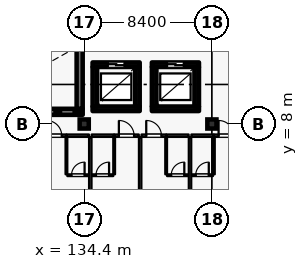
"""IFC4 building model, lengths in metres.
Left out: names, types, materials, properties, quantities, classifications, styles, units other than length and angle.
Written with IfcOpenShell. Run it as: python <this file> out.ifc"""

import sys

from ifc_helpers import new_model, si_unit, direction, frame, frame_2d, origin, origin_2d, place, context, subcontext, project, spatial, rectangle, hollow_rectangle, extrude, element, fill, save


model = new_model("IFC4")
c1 = context("Model", 3, precision=1e-05, world=origin(), true_north=direction((0.0, 1.0)))
c2 = subcontext(c1, "Body", "Model", "MODEL_VIEW")
j1 = project(units=[si_unit("LENGTHUNIT", "METRE"), si_unit("PLANEANGLEUNIT", "RADIAN")], contexts=[c1])
p1 = place(None, origin())
s1 = spatial("IfcSite", under=j1, at=p1, CompositionType="ELEMENT")
p2 = place(p1, origin())
s2 = spatial("IfcBuilding", under=s1, at=p2, CompositionType="ELEMENT")
p3 = place(p2, frame((0.0, 0.0, 36.0)))
s3 = spatial("IfcBuildingStorey", under=s2, at=p3, CompositionType="ELEMENT", Elevation=36.0)
for number, where, z_axis, x_axis in (
    (1, (134.4, 8.0, 0.0), (0.0, 0.0, 1.0), (1.0, 0.0, 0.0)),
    (2, (142.8, 8.0, 0.0), (0.0, 0.0, 1.0), (1.0, 0.0, 0.0)),
):
    element("IfcColumn", number, at=place(p3, frame(where, z_axis=z_axis, x_axis=x_axis)), inside=s3, PredefinedType="COLUMN", context=c2, shape_type="SweptSolid", body=[
        extrude(rectangle(XDim=0.6, YDim=0.6, at=origin_2d()), origin(), (0.0, 0.0, 1.0), 3.6),
    ])
p4 = place(p3, frame((150.85, 7.667, 0.0), z_axis=(0.0, 0.0, 1.0), x_axis=(-0.724116091282, -0.689678103427, 0.0)))
e3 = element("IfcWall", 3, at=p4, inside=s3, PredefinedType="SOLIDWALL", context=c2, shape_type="SweptSolid", body=[
    extrude(rectangle(XDim=10.634, YDim=0.24, at=frame_2d((5.317, 0.0))), origin(), (0.0, 0.0, 1.0), 2.94),
])
p5 = place(p4, frame((1.204, 0.0, 0.0)))
e4 = element("IfcOpeningElement", 4, at=p5, cuts=e3, PredefinedType="OPENING", context=c2, shape_type="SweptSolid", body=[
    extrude(rectangle(XDim=1.5, YDim=2.25, at=frame_2d((0.75, 1.125))), frame((0.0, 0.13, 0.0), z_axis=(0.0, -1.0, 0.0), x_axis=(1.0, 0.0, 0.0)), (0.0, 0.0, 1.0), 0.26),
])
p6 = place(p4, frame((5.511, 0.0, 0.8)))
e5 = element("IfcOpeningElement", 5, at=p6, cuts=e3, PredefinedType="OPENING", context=c2, shape_type="SweptSolid", body=[
    extrude(rectangle(XDim=1.6, YDim=1.6, at=frame_2d((0.8, 0.8))), frame((0.0, 0.13, 0.0), z_axis=(0.0, -1.0, 0.0), x_axis=(1.0, 0.0, 0.0)), (0.0, 0.0, 1.0), 0.26),
])
p7 = place(p4, frame((8.874, 0.0, 0.8)))
e6 = element("IfcOpeningElement", 6, at=p7, cuts=e3, PredefinedType="OPENING", context=c2, shape_type="SweptSolid", body=[
    extrude(rectangle(XDim=1.6, YDim=1.6, at=frame_2d((0.8, 0.8))), frame((0.0, 0.13, 0.0), z_axis=(0.0, -1.0, 0.0), x_axis=(1.0, 0.0, 0.0)), (0.0, 0.0, 1.0), 0.26),
])
p8 = place(p3, frame((134.95, 9.0, 0.0), z_axis=(0.0, 0.0, 1.0), x_axis=(1.0, 0.0, 0.0)))
e7 = element("IfcWall", 7, at=p8, inside=s3, PredefinedType="SHEAR", context=c2, shape_type="SweptSolid", body=[
    extrude(rectangle(XDim=3.1, YDim=0.3, at=frame_2d((1.55, 0.0))), origin(), (0.0, 0.0, 1.0), 3.365),
])
p9 = place(p3, frame((137.9, 9.155, 0.0), z_axis=(0.0, 0.0, 1.0), x_axis=(0.0, 1.0, 0.0)))
e8 = element("IfcWall", 8, at=p9, inside=s3, PredefinedType="SHEAR", context=c2, shape_type="SweptSolid", body=[
    extrude(rectangle(XDim=2.59, YDim=0.3, at=frame_2d((1.295, 0.0))), origin(), (0.0, 0.0, 1.0), 3.365),
])
p10 = place(p3, frame((138.05, 11.9, 0.0), z_axis=(0.0, 0.0, 1.0), x_axis=(-1.0, 0.0, 0.0)))
e9 = element("IfcWall", 9, at=p10, inside=s3, PredefinedType="SHEAR", context=c2, shape_type="SweptSolid", body=[
    extrude(rectangle(XDim=3.1, YDim=0.3, at=frame_2d((1.55, 0.0))), origin(), (0.0, 0.0, 1.0), 3.365),
])
p11 = place(p10, frame((1.0, 0.0, 0.0)))
e10 = element("IfcOpeningElement", 10, at=p11, cuts=e9, PredefinedType="OPENING", context=c2, shape_type="SweptSolid", body=[
    extrude(rectangle(XDim=1.1, YDim=2.2, at=frame_2d((0.55, 1.1))), frame((0.0, 0.16, 0.0), z_axis=(0.0, -1.0, 0.0), x_axis=(1.0, 0.0, 0.0)), (0.0, 0.0, 1.0), 0.32),
])
p12 = place(p3, frame((135.1, 11.745, 0.0), z_axis=(0.0, 0.0, 1.0), x_axis=(0.0, -1.0, 0.0)))
e11 = element("IfcWall", 11, at=p12, inside=s3, PredefinedType="SHEAR", context=c2, shape_type="SweptSolid", body=[
    extrude(rectangle(XDim=2.59, YDim=0.3, at=frame_2d((1.295, 0.0))), origin(), (0.0, 0.0, 1.0), 3.365),
])
p13 = place(p3, frame((138.85, 9.0, 0.0), z_axis=(0.0, 0.0, 1.0), x_axis=(1.0, 0.0, 0.0)))
e12 = element("IfcWall", 12, at=p13, inside=s3, PredefinedType="SHEAR", context=c2, shape_type="SweptSolid", body=[
    extrude(rectangle(XDim=3.1, YDim=0.3, at=frame_2d((1.55, 0.0))), origin(), (0.0, 0.0, 1.0), 3.365),
])
p14 = place(p3, frame((141.8, 9.155, 0.0), z_axis=(0.0, 0.0, 1.0), x_axis=(0.0, 1.0, 0.0)))
e13 = element("IfcWall", 13, at=p14, inside=s3, PredefinedType="SHEAR", context=c2, shape_type="SweptSolid", body=[
    extrude(rectangle(XDim=2.59, YDim=0.3, at=frame_2d((1.295, 0.0))), origin(), (0.0, 0.0, 1.0), 3.365),
])
p15 = place(p3, frame((141.95, 11.9, 0.0), z_axis=(0.0, 0.0, 1.0), x_axis=(-1.0, 0.0, 0.0)))
e14 = element("IfcWall", 14, at=p15, inside=s3, PredefinedType="SHEAR", context=c2, shape_type="SweptSolid", body=[
    extrude(rectangle(XDim=3.1, YDim=0.3, at=frame_2d((1.55, 0.0))), origin(), (0.0, 0.0, 1.0), 3.365),
])
p16 = place(p15, frame((1.0, 0.0, 0.0)))
e15 = element("IfcOpeningElement", 15, at=p16, cuts=e14, PredefinedType="OPENING", context=c2, shape_type="SweptSolid", body=[
    extrude(rectangle(XDim=1.1, YDim=2.2, at=frame_2d((0.55, 1.1))), frame((0.0, 0.16, 0.0), z_axis=(0.0, -1.0, 0.0), x_axis=(1.0, 0.0, 0.0)), (0.0, 0.0, 1.0), 0.32),
])
p17 = place(p3, frame((139.0, 11.745, 0.0), z_axis=(0.0, 0.0, 1.0), x_axis=(0.0, -1.0, 0.0)))
e16 = element("IfcWall", 16, at=p17, inside=s3, PredefinedType="SHEAR", context=c2, shape_type="SweptSolid", body=[
    extrude(rectangle(XDim=2.59, YDim=0.3, at=frame_2d((1.295, 0.0))), origin(), (0.0, 0.0, 1.0), 3.365),
])
p18 = place(p3, frame((126.1, 8.8, 0.0), z_axis=(0.0, 0.0, 1.0), x_axis=(1.0, 0.0, 0.0)))
e17 = element("IfcWall", 17, at=p18, inside=s3, PredefinedType="SHEAR", context=c2, shape_type="SweptSolid", body=[
    extrude(rectangle(XDim=8.2, YDim=0.4, at=frame_2d((4.1, 0.0))), origin(), (0.0, 0.0, 1.0), 3.365),
])
p19 = place(p3, frame((134.1, 9.005, 0.0), z_axis=(0.0, 0.0, 1.0), x_axis=(0.0, 1.0, 0.0)))
e18 = element("IfcWall", 18, at=p19, inside=s3, PredefinedType="SHEAR", context=c2, shape_type="SweptSolid", body=[
    extrude(rectangle(XDim=3.95, YDim=0.4, at=frame_2d((1.975, 0.0))), origin(), (0.0, 0.0, 1.0), 3.365),
])
for number, where, z_axis, x_axis in (
    (19, (132.66, 8.8, -1.8), (0.0, 0.0, 1.0), (1.0, 0.0, 0.0)),
    (20, (133.92, 8.8, -1.8), (0.0, 0.0, 1.0), (1.0, 0.0, 0.0)),
):
    element("IfcColumn", number, at=place(p3, frame(where, z_axis=z_axis, x_axis=x_axis)), inside=s3, PredefinedType="COLUMN", context=c2, shape_type="SweptSolid", body=[
        extrude(hollow_rectangle(XDim=0.3, YDim=0.3, WallThickness=0.012, at=origin_2d()), origin(), (0.0, 0.0, 1.0), 3.42),
    ])
p20 = place(p3, frame((131.61, 7.23, 0.0), z_axis=(0.0, 0.0, 1.0), x_axis=(1.0, 0.0, 0.0)))
e21 = element("IfcWall", 21, at=p20, inside=s3, PredefinedType="PARTITIONING", context=c2, shape_type="SweptSolid", body=[
    extrude(rectangle(XDim=1.62, YDim=0.16, at=frame_2d((0.81, 0.0))), origin(), (0.0, 0.0, 1.0), 3.365),
])
p21 = place(p20, frame((0.31, 0.0, 0.0)))
e22 = element("IfcOpeningElement", 22, at=p21, cuts=e21, PredefinedType="OPENING", context=c2, shape_type="SweptSolid", body=[
    extrude(rectangle(XDim=1.0, YDim=2.25, at=frame_2d((0.5, 1.125))), frame((0.0, 0.09, 0.0), z_axis=(0.0, -1.0, 0.0), x_axis=(1.0, 0.0, 0.0)), (0.0, 0.0, 1.0), 0.18),
])
p22 = place(p3, frame((133.24, 7.23, 0.0), z_axis=(0.0, 0.0, 1.0), x_axis=(1.0, 0.0, 0.0)))
e23 = element("IfcWall", 23, at=p22, inside=s3, PredefinedType="PARTITIONING", context=c2, shape_type="SweptSolid", body=[
    extrude(rectangle(XDim=1.47, YDim=0.16, at=frame_2d((0.735, 0.0))), origin(), (0.0, 0.0, 1.0), 3.365),
])
p23 = place(p3, frame((133.23, 4.69, 0.0), z_axis=(0.0, 0.0, 1.0), x_axis=(0.0, 1.0, 0.0)))
e24 = element("IfcWall", 24, at=p23, inside=s3, PredefinedType="PARTITIONING", context=c2, shape_type="SweptSolid", body=[
    extrude(rectangle(XDim=2.45, YDim=0.115, at=frame_2d((1.225, 0.0))), origin(), (0.0, 0.0, 1.0), 3.365),
])
p24 = place(p3, frame((133.29, 4.63, 0.0), z_axis=(0.0, 0.0, 1.0), x_axis=(1.0, 0.0, 0.0)))
e25 = element("IfcWall", 25, at=p24, inside=s3, PredefinedType="PARTITIONING", context=c2, shape_type="SweptSolid", body=[
    extrude(rectangle(XDim=1.41, YDim=0.115, at=frame_2d((0.705, 0.0))), origin(), (0.0, 0.0, 1.0), 3.365),
])
p25 = place(p24, frame((0.275, 0.0, 0.0)))
e26 = element("IfcOpeningElement", 26, at=p25, cuts=e25, PredefinedType="OPENING", context=c2, shape_type="SweptSolid", body=[
    extrude(rectangle(XDim=0.86, YDim=2.12, at=frame_2d((0.43, 1.06))), frame((0.0, 0.067, 0.0), z_axis=(0.0, -1.0, 0.0), x_axis=(1.0, 0.0, 0.0)), (0.0, 0.0, 1.0), 0.135),
])
p26 = place(p3, frame((134.89, 7.23, 0.0), z_axis=(0.0, 0.0, 1.0), x_axis=(1.0, 0.0, 0.0)))
e27 = element("IfcWall", 27, at=p26, inside=s3, PredefinedType="PARTITIONING", context=c2, shape_type="SweptSolid", body=[
    extrude(rectangle(XDim=1.47, YDim=0.16, at=frame_2d((0.735, 0.0))), origin(), (0.0, 0.0, 1.0), 3.365),
])
p27 = place(p3, frame((136.37, 7.23, 0.0), z_axis=(0.0, 0.0, 1.0), x_axis=(1.0, 0.0, 0.0)))
e28 = element("IfcWall", 28, at=p27, inside=s3, PredefinedType="PARTITIONING", context=c2, shape_type="SweptSolid", body=[
    extrude(rectangle(XDim=1.62, YDim=0.16, at=frame_2d((0.81, 0.0))), origin(), (0.0, 0.0, 1.0), 3.365),
])
p28 = place(p27, frame((0.31, 0.0, 0.0)))
e29 = element("IfcOpeningElement", 29, at=p28, cuts=e28, PredefinedType="OPENING", context=c2, shape_type="SweptSolid", body=[
    extrude(rectangle(XDim=1.0, YDim=2.25, at=frame_2d((0.5, 1.125))), frame((0.0, 0.09, 0.0), z_axis=(0.0, -1.0, 0.0), x_axis=(1.0, 0.0, 0.0)), (0.0, 0.0, 1.0), 0.18),
])
p29 = place(p3, frame((136.37, 4.69, 0.0), z_axis=(0.0, 0.0, 1.0), x_axis=(0.0, 1.0, 0.0)))
e30 = element("IfcWall", 30, at=p29, inside=s3, PredefinedType="PARTITIONING", context=c2, shape_type="SweptSolid", body=[
    extrude(rectangle(XDim=2.45, YDim=0.115, at=frame_2d((1.225, 0.0))), origin(), (0.0, 0.0, 1.0), 3.365),
])
p30 = place(p3, frame((134.9, 4.63, 0.0), z_axis=(0.0, 0.0, 1.0), x_axis=(1.0, 0.0, 0.0)))
e31 = element("IfcWall", 31, at=p30, inside=s3, PredefinedType="PARTITIONING", context=c2, shape_type="SweptSolid", body=[
    extrude(rectangle(XDim=1.41, YDim=0.115, at=frame_2d((0.705, 0.0))), origin(), (0.0, 0.0, 1.0), 3.365),
])
p31 = place(p30, frame((0.275, 0.0, 0.0)))
e32 = element("IfcOpeningElement", 32, at=p31, cuts=e31, PredefinedType="OPENING", context=c2, shape_type="SweptSolid", body=[
    extrude(rectangle(XDim=0.86, YDim=2.12, at=frame_2d((0.43, 1.06))), frame((0.0, 0.067, 0.0), z_axis=(0.0, -1.0, 0.0), x_axis=(1.0, 0.0, 0.0)), (0.0, 0.0, 1.0), 0.135),
])
p32 = place(p3, frame((134.8, 0.34, 0.0), z_axis=(0.0, 0.0, 1.0), x_axis=(0.0, 1.0, 0.0)))
e33 = element("IfcWall", 33, at=p32, inside=s3, PredefinedType="PARTITIONING", context=c2, shape_type="SweptSolid", body=[
    extrude(rectangle(XDim=6.8, YDim=0.16, at=frame_2d((3.4, 0.0))), origin(), (0.0, 0.0, 1.0), 3.365),
])
p33 = place(p3, frame((138.17, 7.23, 0.0), z_axis=(0.0, 0.0, 1.0), x_axis=(1.0, 0.0, 0.0)))
e34 = element("IfcWall", 34, at=p33, inside=s3, PredefinedType="PARTITIONING", context=c2, shape_type="SweptSolid", body=[
    extrude(rectangle(XDim=1.62, YDim=0.16, at=frame_2d((0.81, 0.0))), origin(), (0.0, 0.0, 1.0), 3.365),
])
p34 = place(p33, frame((0.31, 0.0, 0.0)))
e35 = element("IfcOpeningElement", 35, at=p34, cuts=e34, PredefinedType="OPENING", context=c2, shape_type="SweptSolid", body=[
    extrude(rectangle(XDim=1.0, YDim=2.25, at=frame_2d((0.5, 1.125))), frame((0.0, 0.09, 0.0), z_axis=(0.0, -1.0, 0.0), x_axis=(1.0, 0.0, 0.0)), (0.0, 0.0, 1.0), 0.18),
])
p35 = place(p3, frame((139.8, 7.23, 0.0), z_axis=(0.0, 0.0, 1.0), x_axis=(1.0, 0.0, 0.0)))
e36 = element("IfcWall", 36, at=p35, inside=s3, PredefinedType="PARTITIONING", context=c2, shape_type="SweptSolid", body=[
    extrude(rectangle(XDim=1.47, YDim=0.16, at=frame_2d((0.735, 0.0))), origin(), (0.0, 0.0, 1.0), 3.365),
])
p36 = place(p3, frame((139.79, 4.69, 0.0), z_axis=(0.0, 0.0, 1.0), x_axis=(0.0, 1.0, 0.0)))
e37 = element("IfcWall", 37, at=p36, inside=s3, PredefinedType="PARTITIONING", context=c2, shape_type="SweptSolid", body=[
    extrude(rectangle(XDim=2.45, YDim=0.115, at=frame_2d((1.225, 0.0))), origin(), (0.0, 0.0, 1.0), 3.365),
])
p37 = place(p3, frame((139.85, 4.63, 0.0), z_axis=(0.0, 0.0, 1.0), x_axis=(1.0, 0.0, 0.0)))
e38 = element("IfcWall", 38, at=p37, inside=s3, PredefinedType="PARTITIONING", context=c2, shape_type="SweptSolid", body=[
    extrude(rectangle(XDim=1.41, YDim=0.115, at=frame_2d((0.705, 0.0))), origin(), (0.0, 0.0, 1.0), 3.365),
])
p38 = place(p37, frame((0.275, 0.0, 0.0)))
e39 = element("IfcOpeningElement", 39, at=p38, cuts=e38, PredefinedType="OPENING", context=c2, shape_type="SweptSolid", body=[
    extrude(rectangle(XDim=0.86, YDim=2.12, at=frame_2d((0.43, 1.06))), frame((0.0, 0.067, 0.0), z_axis=(0.0, -1.0, 0.0), x_axis=(1.0, 0.0, 0.0)), (0.0, 0.0, 1.0), 0.135),
])
p39 = place(p3, frame((138.08, 0.34, 0.0), z_axis=(0.0, 0.0, 1.0), x_axis=(0.0, 1.0, 0.0)))
e40 = element("IfcWall", 40, at=p39, inside=s3, PredefinedType="PARTITIONING", context=c2, shape_type="SweptSolid", body=[
    extrude(rectangle(XDim=6.8, YDim=0.16, at=frame_2d((3.4, 0.0))), origin(), (0.0, 0.0, 1.0), 3.365),
])
p40 = place(p3, frame((141.45, 7.23, 0.0), z_axis=(0.0, 0.0, 1.0), x_axis=(1.0, 0.0, 0.0)))
e41 = element("IfcWall", 41, at=p40, inside=s3, PredefinedType="PARTITIONING", context=c2, shape_type="SweptSolid", body=[
    extrude(rectangle(XDim=1.47, YDim=0.16, at=frame_2d((0.735, 0.0))), origin(), (0.0, 0.0, 1.0), 3.365),
])
p41 = place(p3, frame((142.93, 7.23, 0.0), z_axis=(0.0, 0.0, 1.0), x_axis=(1.0, 0.0, 0.0)))
e42 = element("IfcWall", 42, at=p41, inside=s3, PredefinedType="PARTITIONING", context=c2, shape_type="SweptSolid", body=[
    extrude(rectangle(XDim=1.62, YDim=0.16, at=frame_2d((0.81, 0.0))), origin(), (0.0, 0.0, 1.0), 3.365),
])
p42 = place(p41, frame((0.31, 0.0, 0.0)))
e43 = element("IfcOpeningElement", 43, at=p42, cuts=e42, PredefinedType="OPENING", context=c2, shape_type="SweptSolid", body=[
    extrude(rectangle(XDim=1.0, YDim=2.25, at=frame_2d((0.5, 1.125))), frame((0.0, 0.09, 0.0), z_axis=(0.0, -1.0, 0.0), x_axis=(1.0, 0.0, 0.0)), (0.0, 0.0, 1.0), 0.18),
])
p43 = place(p3, frame((142.93, 4.69, 0.0), z_axis=(0.0, 0.0, 1.0), x_axis=(0.0, 1.0, 0.0)))
e44 = element("IfcWall", 44, at=p43, inside=s3, PredefinedType="PARTITIONING", context=c2, shape_type="SweptSolid", body=[
    extrude(rectangle(XDim=2.45, YDim=0.115, at=frame_2d((1.225, 0.0))), origin(), (0.0, 0.0, 1.0), 2.74),
])
p44 = place(p3, frame((141.46, 4.63, 0.0), z_axis=(0.0, 0.0, 1.0), x_axis=(1.0, 0.0, 0.0)))
e45 = element("IfcWall", 45, at=p44, inside=s3, PredefinedType="PARTITIONING", context=c2, shape_type="SweptSolid", body=[
    extrude(rectangle(XDim=1.41, YDim=0.115, at=frame_2d((0.705, 0.0))), origin(), (0.0, 0.0, 1.0), 3.365),
])
p45 = place(p44, frame((0.275, 0.0, 0.0)))
e46 = element("IfcOpeningElement", 46, at=p45, cuts=e45, PredefinedType="OPENING", context=c2, shape_type="SweptSolid", body=[
    extrude(rectangle(XDim=0.86, YDim=2.12, at=frame_2d((0.43, 1.06))), frame((0.0, 0.067, 0.0), z_axis=(0.0, -1.0, 0.0), x_axis=(1.0, 0.0, 0.0)), (0.0, 0.0, 1.0), 0.135),
])
p46 = place(p3, frame((141.36, 2.09, 0.0), z_axis=(0.0, 0.0, 1.0), x_axis=(0.0, 1.0, 0.0)))
e47 = element("IfcWall", 47, at=p46, inside=s3, PredefinedType="PARTITIONING", context=c2, shape_type="SweptSolid", body=[
    extrude(rectangle(XDim=5.05, YDim=0.16, at=frame_2d((2.525, 0.0))), origin(), (0.0, 0.0, 1.0), 3.365),
])
p47 = place(p11, origin())
e48 = element("IfcDoor", 48, at=p47, inside=s3, OperationType="DOUBLE_DOOR_SLIDING", PredefinedType="DOOR", context=c2, shape_type="SweptSolid", body=[
    extrude(rectangle(XDim=1.1, YDim=2.2, at=frame_2d((0.55, 1.1))), frame((0.0, 0.025, 0.0), z_axis=(0.0, -1.0, 0.0), x_axis=(1.0, 0.0, 0.0)), (0.0, 0.0, 1.0), 0.05),
])
fill(e10, e48)
p48 = place(p16, origin())
e49 = element("IfcDoor", 49, at=p48, inside=s3, OperationType="DOUBLE_DOOR_SLIDING", PredefinedType="DOOR", context=c2, shape_type="SweptSolid", body=[
    extrude(rectangle(XDim=1.1, YDim=2.2, at=frame_2d((0.55, 1.1))), frame((0.0, 0.025, 0.0), z_axis=(0.0, -1.0, 0.0), x_axis=(1.0, 0.0, 0.0)), (0.0, 0.0, 1.0), 0.05),
])
fill(e15, e49)
p49 = place(p21, origin())
e50 = element("IfcDoor", 50, at=p49, inside=s3, OperationType="SINGLE_SWING_LEFT", PredefinedType="DOOR", context=c2, shape_type="SweptSolid", body=[
    extrude(rectangle(XDim=1.0, YDim=2.25, at=frame_2d((0.5, 1.125))), frame((0.0, 0.025, 0.0), z_axis=(0.0, -1.0, 0.0), x_axis=(1.0, 0.0, 0.0)), (0.0, 0.0, 1.0), 0.05),
])
fill(e22, e50)
p50 = place(p25, origin())
e51 = element("IfcDoor", 51, at=p50, inside=s3, OperationType="SINGLE_SWING_RIGHT", PredefinedType="DOOR", context=c2, shape_type="SweptSolid", body=[
    extrude(rectangle(XDim=0.86, YDim=2.12, at=frame_2d((0.43, 1.06))), frame((0.0, 0.025, 0.0), z_axis=(0.0, -1.0, 0.0), x_axis=(1.0, 0.0, 0.0)), (0.0, 0.0, 1.0), 0.05),
])
fill(e26, e51)
p51 = place(p28, origin())
e52 = element("IfcDoor", 52, at=p51, inside=s3, OperationType="SINGLE_SWING_LEFT", PredefinedType="DOOR", context=c2, shape_type="SweptSolid", body=[
    extrude(rectangle(XDim=1.0, YDim=2.25, at=frame_2d((0.5, 1.125))), frame((0.0, 0.025, 0.0), z_axis=(0.0, -1.0, 0.0), x_axis=(1.0, 0.0, 0.0)), (0.0, 0.0, 1.0), 0.05),
])
fill(e29, e52)
p52 = place(p31, origin())
e53 = element("IfcDoor", 53, at=p52, inside=s3, OperationType="SINGLE_SWING_RIGHT", PredefinedType="DOOR", context=c2, shape_type="SweptSolid", body=[
    extrude(rectangle(XDim=0.86, YDim=2.12, at=frame_2d((0.43, 1.06))), frame((0.0, 0.025, 0.0), z_axis=(0.0, -1.0, 0.0), x_axis=(1.0, 0.0, 0.0)), (0.0, 0.0, 1.0), 0.05),
])
fill(e32, e53)
p53 = place(p34, origin())
e54 = element("IfcDoor", 54, at=p53, inside=s3, OperationType="SINGLE_SWING_LEFT", PredefinedType="DOOR", context=c2, shape_type="SweptSolid", body=[
    extrude(rectangle(XDim=1.0, YDim=2.25, at=frame_2d((0.5, 1.125))), frame((0.0, 0.025, 0.0), z_axis=(0.0, -1.0, 0.0), x_axis=(1.0, 0.0, 0.0)), (0.0, 0.0, 1.0), 0.05),
])
fill(e35, e54)
p54 = place(p38, origin())
e55 = element("IfcDoor", 55, at=p54, inside=s3, OperationType="SINGLE_SWING_RIGHT", PredefinedType="DOOR", context=c2, shape_type="SweptSolid", body=[
    extrude(rectangle(XDim=0.86, YDim=2.12, at=frame_2d((0.43, 1.06))), frame((0.0, 0.025, 0.0), z_axis=(0.0, -1.0, 0.0), x_axis=(1.0, 0.0, 0.0)), (0.0, 0.0, 1.0), 0.05),
])
fill(e39, e55)
p55 = place(p42, origin())
e56 = element("IfcDoor", 56, at=p55, inside=s3, OperationType="SINGLE_SWING_LEFT", PredefinedType="DOOR", context=c2, shape_type="SweptSolid", body=[
    extrude(rectangle(XDim=1.0, YDim=2.25, at=frame_2d((0.5, 1.125))), frame((0.0, 0.025, 0.0), z_axis=(0.0, -1.0, 0.0), x_axis=(1.0, 0.0, 0.0)), (0.0, 0.0, 1.0), 0.05),
])
fill(e43, e56)
p56 = place(p45, origin())
e57 = element("IfcDoor", 57, at=p56, inside=s3, OperationType="SINGLE_SWING_RIGHT", PredefinedType="DOOR", context=c2, shape_type="SweptSolid", body=[
    extrude(rectangle(XDim=0.86, YDim=2.12, at=frame_2d((0.43, 1.06))), frame((0.0, 0.025, 0.0), z_axis=(0.0, -1.0, 0.0), x_axis=(1.0, 0.0, 0.0)), (0.0, 0.0, 1.0), 0.05),
])
fill(e46, e57)
save(model, sys.argv[1])
